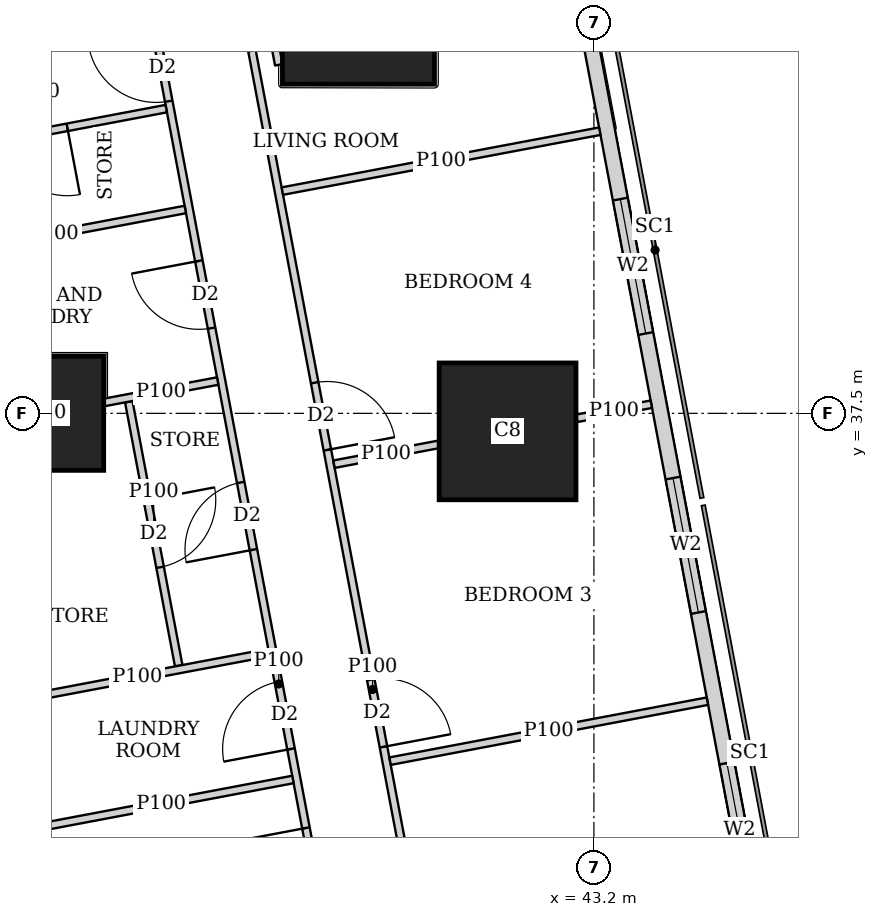
"""IFC4 building model, lengths in metres.
Left out: names, types, materials, properties, quantities, classifications, styles, units other than length and angle.
Written with IfcOpenShell. Run it as: python <this file> out.ifc"""

import sys

from ifc_helpers import new_model, si_unit, direction, frame, frame_2d, origin, origin_2d, place, context, subcontext, project, spatial, rectangle, extrude, element, fill, save


model = new_model("IFC4")
c1 = context("Model", 3, precision=1e-05, world=origin(), true_north=direction((0.0, 1.0)))
c2 = subcontext(c1, "Body", "Model", "MODEL_VIEW")
j1 = project(units=[si_unit("LENGTHUNIT", "METRE"), si_unit("PLANEANGLEUNIT", "RADIAN")], contexts=[c1])
p1 = place(None, origin())
s1 = spatial("IfcSite", under=j1, at=p1, CompositionType="ELEMENT")
p2 = place(p1, origin())
s2 = spatial("IfcBuilding", under=s1, at=p2, CompositionType="ELEMENT")
p3 = place(p2, frame((0.0, 0.0, 135.8)))
s3 = spatial("IfcBuildingStorey", under=s2, at=p3, CompositionType="ELEMENT", Elevation=135.8)
p4 = place(p3, frame((36.0, 37.5, 0.0), z_axis=(0.0, 0.0, 1.0), x_axis=(1.0, 0.0, 0.0)))
e1 = element("IfcColumn", 1, at=p4, inside=s3, PredefinedType="COLUMN", context=c2, shape_type="SweptSolid", body=[
    extrude(rectangle(XDim=1.5, YDim=1.5, at=origin_2d()), origin(), (0.0, 0.0, 1.0), 3.75),
])
p5 = place(p3, frame((42.064, 37.263, 0.0), z_axis=(0.0, 0.0, 1.0), x_axis=(1.0, 0.0, 0.0)))
e2 = element("IfcColumn", 2, at=p5, inside=s3, PredefinedType="COLUMN", context=c2, shape_type="SweptSolid", body=[
    extrude(rectangle(XDim=1.8, YDim=1.8, at=origin_2d()), origin(), (0.0, 0.0, 1.0), 3.75),
])
p6 = place(p3, frame((40.102, 42.83, 0.0), z_axis=(0.0, 0.0, 1.0), x_axis=(1.0, 0.0, 0.0)))
e3 = element("IfcColumn", 3, at=p6, inside=s3, PredefinedType="COLUMN", context=c2, shape_type="SweptSolid", body=[
    extrude(rectangle(XDim=2.0, YDim=2.0, at=origin_2d()), origin(), (0.0, 0.0, 1.0), 3.75),
])
p7 = place(p3, frame((50.653, 2.703, 0.0), z_axis=(0.0, 0.0, 1.0), x_axis=(-0.185612026696, 0.982623109613, 0.0)))
e4 = element("IfcWall", 4, at=p7, inside=s3, PredefinedType="SOLIDWALL", context=c2, shape_type="SweptSolid", body=[
    extrude(rectangle(XDim=41.393, YDim=0.2, at=frame_2d((20.697, 0.0))), origin(), (0.0, 0.0, 1.0), 3.5),
])
p8 = place(p7, frame((1.633, 0.0, 0.9)))
e5 = element("IfcOpeningElement", 5, at=p8, cuts=e4, PredefinedType="OPENING", context=c2, shape_type="SweptSolid", body=[
    extrude(rectangle(XDim=1.8, YDim=1.5, at=frame_2d((0.9, 0.75))), frame((0.0, 0.11, 0.0), z_axis=(0.0, -1.0, 0.0), x_axis=(1.0, 0.0, 0.0)), (0.0, 0.0, 1.0), 0.22),
])
p9 = place(p7, frame((6.032, 0.0, 0.9)))
e6 = element("IfcOpeningElement", 6, at=p9, cuts=e4, PredefinedType="OPENING", context=c2, shape_type="SweptSolid", body=[
    extrude(rectangle(XDim=1.8, YDim=1.5, at=frame_2d((0.9, 0.75))), frame((0.0, 0.11, 0.0), z_axis=(0.0, -1.0, 0.0), x_axis=(1.0, 0.0, 0.0)), (0.0, 0.0, 1.0), 0.22),
])
p10 = place(p7, frame((9.848, 0.0, 0.9)))
e7 = element("IfcOpeningElement", 7, at=p10, cuts=e4, PredefinedType="OPENING", context=c2, shape_type="SweptSolid", body=[
    extrude(rectangle(XDim=1.8, YDim=1.5, at=frame_2d((0.9, 0.75))), frame((0.0, 0.11, 0.0), z_axis=(0.0, -1.0, 0.0), x_axis=(1.0, 0.0, 0.0)), (0.0, 0.0, 1.0), 0.22),
])
p11 = place(p7, frame((13.664, 0.0, 0.9)))
e8 = element("IfcOpeningElement", 8, at=p11, cuts=e4, PredefinedType="OPENING", context=c2, shape_type="SweptSolid", body=[
    extrude(rectangle(XDim=1.8, YDim=1.5, at=frame_2d((0.9, 0.75))), frame((0.0, 0.11, 0.0), z_axis=(0.0, -1.0, 0.0), x_axis=(1.0, 0.0, 0.0)), (0.0, 0.0, 1.0), 0.22),
])
p12 = place(p7, frame((17.481, 0.0, 0.9)))
e9 = element("IfcOpeningElement", 9, at=p12, cuts=e4, PredefinedType="OPENING", context=c2, shape_type="SweptSolid", body=[
    extrude(rectangle(XDim=1.8, YDim=1.5, at=frame_2d((0.9, 0.75))), frame((0.0, 0.11, 0.0), z_axis=(0.0, -1.0, 0.0), x_axis=(1.0, 0.0, 0.0)), (0.0, 0.0, 1.0), 0.22),
])
p13 = place(p7, frame((21.297, 0.0, 0.9)))
e10 = element("IfcOpeningElement", 10, at=p13, cuts=e4, PredefinedType="OPENING", context=c2, shape_type="SweptSolid", body=[
    extrude(rectangle(XDim=1.8, YDim=1.5, at=frame_2d((0.9, 0.75))), frame((0.0, 0.11, 0.0), z_axis=(0.0, -1.0, 0.0), x_axis=(1.0, 0.0, 0.0)), (0.0, 0.0, 1.0), 0.22),
])
p14 = place(p7, frame((25.113, 0.0, 0.9)))
e11 = element("IfcOpeningElement", 11, at=p14, cuts=e4, PredefinedType="OPENING", context=c2, shape_type="SweptSolid", body=[
    extrude(rectangle(XDim=1.8, YDim=1.5, at=frame_2d((0.9, 0.75))), frame((0.0, 0.11, 0.0), z_axis=(0.0, -1.0, 0.0), x_axis=(1.0, 0.0, 0.0)), (0.0, 0.0, 1.0), 0.22),
])
p15 = place(p7, frame((28.93, 0.0, 0.9)))
e12 = element("IfcOpeningElement", 12, at=p15, cuts=e4, PredefinedType="OPENING", context=c2, shape_type="SweptSolid", body=[
    extrude(rectangle(XDim=1.8, YDim=1.5, at=frame_2d((0.9, 0.75))), frame((0.0, 0.11, 0.0), z_axis=(0.0, -1.0, 0.0), x_axis=(1.0, 0.0, 0.0)), (0.0, 0.0, 1.0), 0.22),
])
p16 = place(p7, frame((32.746, 0.0, 0.9)))
e13 = element("IfcOpeningElement", 13, at=p16, cuts=e4, PredefinedType="OPENING", context=c2, shape_type="SweptSolid", body=[
    extrude(rectangle(XDim=1.8, YDim=1.5, at=frame_2d((0.9, 0.75))), frame((0.0, 0.11, 0.0), z_axis=(0.0, -1.0, 0.0), x_axis=(1.0, 0.0, 0.0)), (0.0, 0.0, 1.0), 0.22),
])
p17 = place(p7, frame((36.481, 0.0, 0.9)))
e14 = element("IfcOpeningElement", 14, at=p17, cuts=e4, PredefinedType="OPENING", context=c2, shape_type="SweptSolid", body=[
    extrude(rectangle(XDim=1.8, YDim=1.5, at=frame_2d((0.9, 0.75))), frame((0.0, 0.11, 0.0), z_axis=(0.0, -1.0, 0.0), x_axis=(1.0, 0.0, 0.0)), (0.0, 0.0, 1.0), 0.22),
])
p18 = place(p3, frame((33.623, 43.022, 0.0), z_axis=(0.0, 0.0, 1.0), x_axis=(0.185596841028, -0.98262597798, 0.0)))
e15 = element("IfcWall", 15, at=p18, inside=s3, PredefinedType="SOLIDWALL", context=c2, shape_type="SweptSolid", body=[
    extrude(rectangle(XDim=41.66, YDim=0.15, at=frame_2d((20.83, 0.0))), origin(), (0.0, 0.0, 1.0), 2.5),
])
p19 = place(p18, frame((20.242, 0.0, 0.0)))
e16 = element("IfcOpeningElement", 16, at=p19, cuts=e15, PredefinedType="OPENING", context=c2, shape_type="SweptSolid", body=[
    extrude(rectangle(XDim=1.0, YDim=2.1, at=frame_2d((0.5, 1.05))), frame((0.0, 0.085, 0.0), z_axis=(0.0, -1.0, 0.0), x_axis=(1.0, 0.0, 0.0)), (0.0, 0.0, 1.0), 0.17),
])
p20 = place(p18, frame((24.714, 0.0, 0.0)))
e17 = element("IfcOpeningElement", 17, at=p20, cuts=e15, PredefinedType="OPENING", context=c2, shape_type="SweptSolid", body=[
    extrude(rectangle(XDim=1.0, YDim=2.1, at=frame_2d((0.5, 1.05))), frame((0.0, 0.085, 0.0), z_axis=(0.0, -1.0, 0.0), x_axis=(1.0, 0.0, 0.0)), (0.0, 0.0, 1.0), 0.17),
])
p21 = place(p18, frame((31.206, 0.0, 0.0)))
e18 = element("IfcOpeningElement", 18, at=p21, cuts=e15, PredefinedType="OPENING", context=c2, shape_type="SweptSolid", body=[
    extrude(rectangle(XDim=1.0, YDim=2.1, at=frame_2d((0.5, 1.05))), frame((0.0, 0.085, 0.0), z_axis=(0.0, -1.0, 0.0), x_axis=(1.0, 0.0, 0.0)), (0.0, 0.0, 1.0), 0.17),
])
p22 = place(p3, frame((39.054, 42.085, 0.0), z_axis=(0.0, 0.0, 1.0), x_axis=(-0.185791584218, 0.982589175207, 0.0)))
e19 = element("IfcWall", 19, at=p22, inside=s3, PredefinedType="PARTITIONING", context=c2, shape_type="SweptSolid", body=[
    extrude(rectangle(XDim=3.628, YDim=0.1, at=frame_2d((1.814, 0.0))), origin(), (0.0, 0.0, 1.0), 2.1),
])
p23 = place(p3, frame((38.701, 42.27, 0.0), z_axis=(0.0, 0.0, 1.0), x_axis=(0.185640619081, -0.98261770824, 0.0)))
e20 = element("IfcWall", 20, at=p23, inside=s3, PredefinedType="PARTITIONING", context=c2, shape_type="SweptSolid", body=[
    extrude(rectangle(XDim=17.103, YDim=0.1, at=frame_2d((8.552, 0.0))), origin(), (0.0, 0.0, 1.0), 2.5),
])
p24 = place(p23, frame((16.053, 0.0, 0.0)))
e21 = element("IfcOpeningElement", 21, at=p24, cuts=e20, PredefinedType="OPENING", context=c2, shape_type="SweptSolid", body=[
    extrude(rectangle(XDim=0.9, YDim=2.1, at=frame_2d((0.45, 1.05))), frame((0.0, 0.06, 0.0), z_axis=(0.0, -1.0, 0.0), x_axis=(1.0, 0.0, 0.0)), (0.0, 0.0, 1.0), 0.12),
])
p25 = place(p23, frame((12.077, 0.0, 0.0)))
e22 = element("IfcOpeningElement", 22, at=p25, cuts=e20, PredefinedType="OPENING", context=c2, shape_type="SweptSolid", body=[
    extrude(rectangle(XDim=0.9, YDim=2.1, at=frame_2d((0.45, 1.05))), frame((0.0, 0.06, 0.0), z_axis=(0.0, -1.0, 0.0), x_axis=(1.0, 0.0, 0.0)), (0.0, 0.0, 1.0), 0.12),
])
p26 = place(p23, frame((8.42, 0.0, 0.0)))
e23 = element("IfcOpeningElement", 23, at=p26, cuts=e20, PredefinedType="OPENING", context=c2, shape_type="SweptSolid", body=[
    extrude(rectangle(XDim=0.9, YDim=2.1, at=frame_2d((0.45, 1.05))), frame((0.0, 0.06, 0.0), z_axis=(0.0, -1.0, 0.0), x_axis=(1.0, 0.0, 0.0)), (0.0, 0.0, 1.0), 0.12),
])
p27 = place(p23, frame((4.444, 0.0, 0.0)))
e24 = element("IfcOpeningElement", 24, at=p27, cuts=e20, PredefinedType="OPENING", context=c2, shape_type="SweptSolid", body=[
    extrude(rectangle(XDim=0.9, YDim=2.1, at=frame_2d((0.45, 1.05))), frame((0.0, 0.06, 0.0), z_axis=(0.0, -1.0, 0.0), x_axis=(1.0, 0.0, 0.0)), (0.0, 0.0, 1.0), 0.12),
])
p28 = place(p3, frame((37.411, 42.638, 0.0), z_axis=(0.0, 0.0, 1.0), x_axis=(0.185555586706, -0.982633769134, 0.0)))
e25 = element("IfcWall", 25, at=p28, inside=s3, PredefinedType="PARTITIONING", context=c2, shape_type="SweptSolid", body=[
    extrude(rectangle(XDim=17.704, YDim=0.1, at=frame_2d((8.852, 0.0))), origin(), (0.0, 0.0, 1.0), 2.5),
])
p29 = place(p28, frame((16.28, 0.0, 0.0)))
e26 = element("IfcOpeningElement", 26, at=p29, cuts=e25, PredefinedType="OPENING", context=c2, shape_type="SweptSolid", body=[
    extrude(rectangle(XDim=0.9, YDim=2.1, at=frame_2d((0.45, 1.05))), frame((0.0, 0.06, 0.0), z_axis=(0.0, -1.0, 0.0), x_axis=(1.0, 0.0, 0.0)), (0.0, 0.0, 1.0), 0.12),
])
p30 = place(p28, frame((12.688, 0.0, 0.0)))
e27 = element("IfcOpeningElement", 27, at=p30, cuts=e25, PredefinedType="OPENING", context=c2, shape_type="SweptSolid", body=[
    extrude(rectangle(XDim=0.9, YDim=2.1, at=frame_2d((0.45, 1.05))), frame((0.0, 0.06, 0.0), z_axis=(0.0, -1.0, 0.0), x_axis=(1.0, 0.0, 0.0)), (0.0, 0.0, 1.0), 0.12),
])
p31 = place(p28, frame((8.822, 0.0, 0.0)))
e28 = element("IfcOpeningElement", 28, at=p31, cuts=e25, PredefinedType="OPENING", context=c2, shape_type="SweptSolid", body=[
    extrude(rectangle(XDim=0.9, YDim=2.1, at=frame_2d((0.45, 1.05))), frame((0.0, 0.06, 0.0), z_axis=(0.0, -1.0, 0.0), x_axis=(1.0, 0.0, 0.0)), (0.0, 0.0, 1.0), 0.12),
])
p32 = place(p28, frame((3.188, 0.0, 0.0)))
e29 = element("IfcOpeningElement", 29, at=p32, cuts=e25, PredefinedType="OPENING", context=c2, shape_type="SweptSolid", body=[
    extrude(rectangle(XDim=0.9, YDim=2.1, at=frame_2d((0.45, 1.05))), frame((0.0, 0.06, 0.0), z_axis=(0.0, -1.0, 0.0), x_axis=(1.0, 0.0, 0.0)), (0.0, 0.0, 1.0), 0.12),
])
p33 = place(p28, frame((0.15, 0.0, 0.0)))
e30 = element("IfcOpeningElement", 30, at=p33, cuts=e25, PredefinedType="OPENING", context=c2, shape_type="SweptSolid", body=[
    extrude(rectangle(XDim=0.9, YDim=2.1, at=frame_2d((0.45, 1.05))), frame((0.0, 0.06, 0.0), z_axis=(0.0, -1.0, 0.0), x_axis=(1.0, 0.0, 0.0)), (0.0, 0.0, 1.0), 0.12),
])
p34 = place(p28, frame((14.371, 0.0, 0.0)))
e31 = element("IfcOpeningElement", 31, at=p34, cuts=e25, PredefinedType="OPENING", context=c2, shape_type="SweptSolid", body=[
    extrude(rectangle(XDim=0.9, YDim=2.1, at=frame_2d((0.45, 1.05))), frame((0.0, 0.06, 0.0), z_axis=(0.0, -1.0, 0.0), x_axis=(1.0, 0.0, 0.0)), (0.0, 0.0, 1.0), 0.12),
])
p35 = place(p28, frame((10.78, 0.0, 0.0)))
e32 = element("IfcOpeningElement", 32, at=p35, cuts=e25, PredefinedType="OPENING", context=c2, shape_type="SweptSolid", body=[
    extrude(rectangle(XDim=0.9, YDim=2.1, at=frame_2d((0.45, 1.05))), frame((0.0, 0.06, 0.0), z_axis=(0.0, -1.0, 0.0), x_axis=(1.0, 0.0, 0.0)), (0.0, 0.0, 1.0), 0.12),
])
p36 = place(p28, frame((6.154, 0.0, 0.0)))
e33 = element("IfcOpeningElement", 33, at=p36, cuts=e25, PredefinedType="OPENING", context=c2, shape_type="SweptSolid", body=[
    extrude(rectangle(XDim=0.9, YDim=2.1, at=frame_2d((0.45, 1.05))), frame((0.0, 0.06, 0.0), z_axis=(0.0, -1.0, 0.0), x_axis=(1.0, 0.0, 0.0)), (0.0, 0.0, 1.0), 0.12),
])
p37 = place(p3, frame((43.277, 41.212, 0.0), z_axis=(0.0, 0.0, 1.0), x_axis=(-0.982665405803, -0.185387972203, 0.0)))
e34 = element("IfcWall", 34, at=p37, inside=s3, PredefinedType="PARTITIONING", context=c2, shape_type="SweptSolid", body=[
    extrude(rectangle(XDim=4.25, YDim=0.1, at=frame_2d((2.125, 0.0))), origin(), (0.0, 0.0, 1.0), 2.1),
])
p38 = place(p3, frame((43.955, 37.62, 0.0), z_axis=(0.0, 0.0, 1.0), x_axis=(-0.982666697719, -0.185381124159, 0.0)))
e35 = element("IfcWall", 35, at=p38, inside=s3, PredefinedType="PARTITIONING", context=c2, shape_type="SweptSolid", body=[
    extrude(rectangle(XDim=0.998, YDim=0.1, at=frame_2d((0.499, 0.0))), origin(), (0.0, 0.0, 1.0), 3.5),
])
p39 = place(p3, frame((41.154, 37.091, 0.0), z_axis=(0.0, 0.0, 1.0), x_axis=(-0.982562488259, -0.185932667021, 0.0)))
e36 = element("IfcWall", 36, at=p39, inside=s3, PredefinedType="PARTITIONING", context=c2, shape_type="SweptSolid", body=[
    extrude(rectangle(XDim=1.398, YDim=0.1, at=frame_2d((0.699, 0.0))), origin(), (0.0, 0.0, 1.0), 3.5),
])
p40 = place(p3, frame((44.693, 33.713, 0.0), z_axis=(0.0, 0.0, 1.0), x_axis=(-0.982615600536, -0.185651775062, 0.0)))
e37 = element("IfcWall", 37, at=p40, inside=s3, PredefinedType="PARTITIONING", context=c2, shape_type="SweptSolid", body=[
    extrude(rectangle(XDim=4.249, YDim=0.1, at=frame_2d((2.125, 0.0))), origin(), (0.0, 0.0, 1.0), 2.1),
])
p41 = place(p3, frame((37.824, 40.182, 0.0), z_axis=(0.0, 0.0, 1.0), x_axis=(-0.982648794755, -0.185475998897, 0.0)))
e38 = element("IfcWall", 38, at=p41, inside=s3, PredefinedType="PARTITIONING", context=c2, shape_type="SweptSolid", body=[
    extrude(rectangle(XDim=3.525, YDim=0.1, at=frame_2d((1.763, 0.0))), origin(), (0.0, 0.0, 1.0), 3.5),
])
p42 = place(p3, frame((38.25, 37.925, 0.0), z_axis=(0.0, 0.0, 1.0), x_axis=(-0.982676595259, -0.18532865167, 0.0)))
e39 = element("IfcWall", 39, at=p42, inside=s3, PredefinedType="PARTITIONING", context=c2, shape_type="SweptSolid", body=[
    extrude(rectangle(XDim=1.516, YDim=0.1, at=frame_2d((0.758, 0.0))), origin(), (0.0, 0.0, 1.0), 3.5),
])
p43 = place(p3, frame((39.24, 32.683, 0.0), z_axis=(0.0, 0.0, 1.0), x_axis=(-0.982638553676, -0.185530247748, 0.0)))
e40 = element("IfcWall", 40, at=p43, inside=s3, PredefinedType="PARTITIONING", context=c2, shape_type="SweptSolid", body=[
    extrude(rectangle(XDim=3.525, YDim=0.1, at=frame_2d((1.763, 0.0))), origin(), (0.0, 0.0, 1.0), 3.5),
])
p44 = place(p3, frame((38.924, 34.353, 0.0), z_axis=(0.0, 0.0, 1.0), x_axis=(-0.982629014545, -0.18558076348, 0.0)))
e41 = element("IfcWall", 41, at=p44, inside=s3, PredefinedType="PARTITIONING", context=c2, shape_type="SweptSolid", body=[
    extrude(rectangle(XDim=3.524, YDim=0.1, at=frame_2d((1.762, 0.0))), origin(), (0.0, 0.0, 1.0), 3.5),
])
p45 = place(p3, frame((37.08, 37.653, 0.0), z_axis=(0.0, 0.0, 1.0), x_axis=(0.185864634688, -0.982575359742, 0.0)))
e42 = element("IfcWall", 42, at=p45, inside=s3, PredefinedType="PARTITIONING", context=c2, shape_type="SweptSolid", body=[
    extrude(rectangle(XDim=3.535, YDim=0.1, at=frame_2d((1.767, 0.0))), origin(), (0.0, 0.0, 1.0), 3.5),
])
p46 = place(p45, frame((1.317, 0.0, 0.0)))
e43 = element("IfcOpeningElement", 43, at=p46, cuts=e42, PredefinedType="OPENING", context=c2, shape_type="SweptSolid", body=[
    extrude(rectangle(XDim=0.9, YDim=2.1, at=frame_2d((0.45, 1.05))), frame((0.0, 0.06, 0.0), z_axis=(0.0, -1.0, 0.0), x_axis=(1.0, 0.0, 0.0)), (0.0, 0.0, 1.0), 0.12),
])
p47 = place(p3, frame((37.573, 41.509, 0.0), z_axis=(0.0, 0.0, 1.0), x_axis=(-0.982638553676, -0.185530247748, 0.0)))
e44 = element("IfcWall", 44, at=p47, inside=s3, PredefinedType="PARTITIONING", context=c2, shape_type="SweptSolid", body=[
    extrude(rectangle(XDim=3.525, YDim=0.1, at=frame_2d((1.763, 0.0))), origin(), (0.0, 0.0, 1.0), 3.5),
])
p48 = place(p47, frame((1.325, 0.0, 0.0)))
e45 = element("IfcOpeningElement", 45, at=p48, cuts=e44, PredefinedType="OPENING", context=c2, shape_type="SweptSolid", body=[
    extrude(rectangle(XDim=0.9, YDim=2.1, at=frame_2d((0.45, 1.05))), frame((0.0, 0.06, 0.0), z_axis=(0.0, -1.0, 0.0), x_axis=(1.0, 0.0, 0.0)), (0.0, 0.0, 1.0), 0.12),
])
p49 = place(p15, origin())
e46 = element("IfcWindow", 46, at=p49, inside=s3, PartitioningType="SINGLE_PANEL", PredefinedType="WINDOW", context=c2, shape_type="SweptSolid", body=[
    extrude(rectangle(XDim=1.8, YDim=1.5, at=frame_2d((0.9, 0.75))), frame((0.0, 0.03, 0.0), z_axis=(0.0, -1.0, 0.0), x_axis=(1.0, 0.0, 0.0)), (0.0, 0.0, 1.0), 0.06),
])
fill(e12, e46)
p50 = place(p16, origin())
e47 = element("IfcWindow", 47, at=p50, inside=s3, PartitioningType="SINGLE_PANEL", PredefinedType="WINDOW", context=c2, shape_type="SweptSolid", body=[
    extrude(rectangle(XDim=1.8, YDim=1.5, at=frame_2d((0.9, 0.75))), frame((0.0, 0.03, 0.0), z_axis=(0.0, -1.0, 0.0), x_axis=(1.0, 0.0, 0.0)), (0.0, 0.0, 1.0), 0.06),
])
fill(e13, e47)
p51 = place(p17, origin())
e48 = element("IfcWindow", 48, at=p51, inside=s3, PartitioningType="SINGLE_PANEL", PredefinedType="WINDOW", context=c2, shape_type="SweptSolid", body=[
    extrude(rectangle(XDim=1.8, YDim=1.5, at=frame_2d((0.9, 0.75))), frame((0.0, 0.03, 0.0), z_axis=(0.0, -1.0, 0.0), x_axis=(1.0, 0.0, 0.0)), (0.0, 0.0, 1.0), 0.06),
])
fill(e14, e48)
p52 = place(p26, origin())
e49 = element("IfcDoor", 49, at=p52, inside=s3, OperationType="SINGLE_SWING_RIGHT", PredefinedType="DOOR", context=c2, shape_type="SweptSolid", body=[
    extrude(rectangle(XDim=0.9, YDim=2.1, at=frame_2d((0.45, 1.05))), frame((0.0, 0.025, 0.0), z_axis=(0.0, -1.0, 0.0), x_axis=(1.0, 0.0, 0.0)), (0.0, 0.0, 1.0), 0.05),
])
fill(e23, e49)
p53 = place(p27, origin())
e50 = element("IfcDoor", 50, at=p53, inside=s3, OperationType="SINGLE_SWING_RIGHT", PredefinedType="DOOR", context=c2, shape_type="SweptSolid", body=[
    extrude(rectangle(XDim=0.9, YDim=2.1, at=frame_2d((0.45, 1.05))), frame((0.0, 0.025, 0.0), z_axis=(0.0, -1.0, 0.0), x_axis=(1.0, 0.0, 0.0)), (0.0, 0.0, 1.0), 0.05),
])
fill(e24, e50)
p54 = place(p31, origin())
e51 = element("IfcDoor", 51, at=p54, inside=s3, OperationType="SINGLE_SWING_LEFT", PredefinedType="DOOR", context=c2, shape_type="SweptSolid", body=[
    extrude(rectangle(XDim=0.9, YDim=2.1, at=frame_2d((0.45, 1.05))), frame((0.0, 0.025, 0.0), z_axis=(0.0, -1.0, 0.0), x_axis=(1.0, 0.0, 0.0)), (0.0, 0.0, 1.0), 0.05),
])
fill(e28, e51)
p55 = place(p32, origin())
e52 = element("IfcDoor", 52, at=p55, inside=s3, OperationType="SINGLE_SWING_RIGHT", PredefinedType="DOOR", context=c2, shape_type="SweptSolid", body=[
    extrude(rectangle(XDim=0.9, YDim=2.1, at=frame_2d((0.45, 1.05))), frame((0.0, 0.025, 0.0), z_axis=(0.0, -1.0, 0.0), x_axis=(1.0, 0.0, 0.0)), (0.0, 0.0, 1.0), 0.05),
])
fill(e29, e52)
p56 = place(p33, origin())
e53 = element("IfcDoor", 53, at=p56, inside=s3, OperationType="SINGLE_SWING_RIGHT", PredefinedType="DOOR", context=c2, shape_type="SweptSolid", body=[
    extrude(rectangle(XDim=0.9, YDim=2.1, at=frame_2d((0.45, 1.05))), frame((0.0, 0.025, 0.0), z_axis=(0.0, -1.0, 0.0), x_axis=(1.0, 0.0, 0.0)), (0.0, 0.0, 1.0), 0.05),
])
fill(e30, e53)
p57 = place(p35, origin())
e54 = element("IfcDoor", 54, at=p57, inside=s3, OperationType="SINGLE_SWING_RIGHT", PredefinedType="DOOR", context=c2, shape_type="SweptSolid", body=[
    extrude(rectangle(XDim=0.9, YDim=2.1, at=frame_2d((0.45, 1.05))), frame((0.0, 0.025, 0.0), z_axis=(0.0, -1.0, 0.0), x_axis=(1.0, 0.0, 0.0)), (0.0, 0.0, 1.0), 0.05),
])
fill(e32, e54)
p58 = place(p36, origin())
e55 = element("IfcDoor", 55, at=p58, inside=s3, OperationType="SINGLE_SWING_LEFT", PredefinedType="DOOR", context=c2, shape_type="SweptSolid", body=[
    extrude(rectangle(XDim=0.9, YDim=2.1, at=frame_2d((0.45, 1.05))), frame((0.0, 0.025, 0.0), z_axis=(0.0, -1.0, 0.0), x_axis=(1.0, 0.0, 0.0)), (0.0, 0.0, 1.0), 0.05),
])
fill(e33, e55)
p59 = place(p46, origin())
e56 = element("IfcDoor", 56, at=p59, inside=s3, OperationType="SINGLE_SWING_LEFT", PredefinedType="DOOR", context=c2, shape_type="SweptSolid", body=[
    extrude(rectangle(XDim=0.9, YDim=2.1, at=frame_2d((0.45, 1.05))), frame((0.0, 0.025, 0.0), z_axis=(0.0, -1.0, 0.0), x_axis=(1.0, 0.0, 0.0)), (0.0, 0.0, 1.0), 0.05),
])
fill(e43, e56)
p60 = place(p48, origin())
e57 = element("IfcDoor", 57, at=p60, inside=s3, OperationType="SINGLE_SWING_LEFT", PredefinedType="DOOR", context=c2, shape_type="SweptSolid", body=[
    extrude(rectangle(XDim=0.9, YDim=2.1, at=frame_2d((0.45, 1.05))), frame((0.0, 0.025, 0.0), z_axis=(0.0, -1.0, 0.0), x_axis=(1.0, 0.0, 0.0)), (0.0, 0.0, 1.0), 0.05),
])
fill(e45, e57)
save(model, sys.argv[1])
